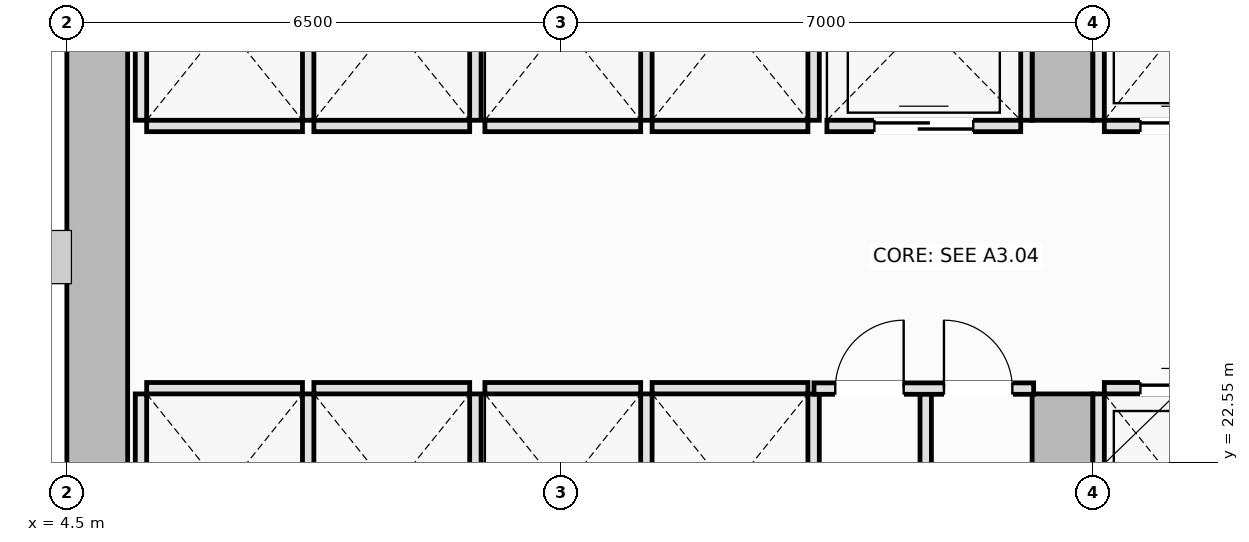
"""IFC4 building model, lengths in metres.
Left out: names, types, materials, properties, quantities, classifications, styles, units other than length and angle.
Written with IfcOpenShell. Run it as: python <this file> out.ifc"""

import sys

from ifc_helpers import new_model, si_unit, direction, frame, frame_2d, origin, place, context, subcontext, project, spatial, rectangle, extrude, element, fill, save


model = new_model("IFC4")
c1 = context("Model", 3, precision=1e-05, world=origin(), true_north=direction((0.0, 1.0)))
c2 = subcontext(c1, "Body", "Model", "MODEL_VIEW")
j1 = project(units=[si_unit("LENGTHUNIT", "METRE"), si_unit("PLANEANGLEUNIT", "RADIAN")], contexts=[c1])
p1 = place(None, origin())
s1 = spatial("IfcSite", under=j1, at=p1, CompositionType="ELEMENT")
p2 = place(p1, origin())
s2 = spatial("IfcBuilding", under=s1, at=p2, CompositionType="ELEMENT")
p3 = place(p2, frame((0.0, 0.0, 46.9)))
s3 = spatial("IfcBuildingStorey", under=s2, at=p3, CompositionType="ELEMENT", Elevation=46.9)
p4 = place(p3, frame((4.9, 14.8, 0.0), z_axis=(0.0, 0.0, 1.0), x_axis=(0.0, 1.0, 0.0)))
e1 = element("IfcWall", 1, at=p4, inside=s3, PredefinedType="SHEAR", context=c2, shape_type="SweptSolid", body=[
    extrude(rectangle(XDim=20.9, YDim=0.8, at=frame_2d((10.45, 0.0))), origin(), (0.0, 0.0, 1.0), 3.55),
])
p5 = place(p3, frame((17.6, 14.8, 0.0), z_axis=(0.0, 0.0, 1.0), x_axis=(0.0, 1.0, 0.0)))
e2 = element("IfcWall", 2, at=p5, inside=s3, PredefinedType="SHEAR", context=c2, shape_type="SweptSolid", body=[
    extrude(rectangle(XDim=8.65, YDim=0.8, at=frame_2d((4.325, 0.0))), origin(), (0.0, 0.0, 1.0), 3.55),
])
p6 = place(p5, frame((4.1, 0.0, 0.0)))
e3 = element("IfcOpeningElement", 3, at=p6, cuts=e2, PredefinedType="OPENING", context=c2, shape_type="SweptSolid", body=[
    extrude(rectangle(XDim=1.1, YDim=2.15, at=frame_2d((0.55, 1.075))), frame((0.0, 0.41, 0.0), z_axis=(0.0, -1.0, 0.0), x_axis=(1.0, 0.0, 0.0)), (0.0, 0.0, 1.0), 0.82),
])
p7 = place(p3, frame((17.6, 27.05, 0.0), z_axis=(0.0, 0.0, 1.0), x_axis=(0.0, 1.0, 0.0)))
e4 = element("IfcWall", 4, at=p7, inside=s3, PredefinedType="SHEAR", context=c2, shape_type="SweptSolid", body=[
    extrude(rectangle(XDim=8.65, YDim=0.8, at=frame_2d((4.325, 0.0))), origin(), (0.0, 0.0, 1.0), 3.55),
])
p8 = place(p7, frame((3.45, 0.0, 0.0)))
e5 = element("IfcOpeningElement", 5, at=p8, cuts=e4, PredefinedType="OPENING", context=c2, shape_type="SweptSolid", body=[
    extrude(rectangle(XDim=1.1, YDim=2.15, at=frame_2d((0.55, 1.075))), frame((0.0, 0.41, 0.0), z_axis=(0.0, -1.0, 0.0), x_axis=(1.0, 0.0, 0.0)), (0.0, 0.0, 1.0), 0.82),
])
p9 = place(p3, frame((18.15, 23.525, 0.0), z_axis=(0.0, 0.0, 1.0), x_axis=(1.0, 0.0, 0.0)))
e6 = element("IfcWall", 6, at=p9, inside=s3, PredefinedType="PARTITIONING", context=c2, shape_type="SweptSolid", body=[
    extrude(rectangle(XDim=2.05, YDim=0.15, at=frame_2d((1.025, 0.0))), origin(), (0.0, 0.0, 1.0), 3.37),
])
p10 = place(p9, frame((0.475, 0.0, 0.0)))
e7 = element("IfcOpeningElement", 7, at=p10, cuts=e6, PredefinedType="OPENING", context=c2, shape_type="SweptSolid", body=[
    extrude(rectangle(XDim=1.1, YDim=2.2, at=frame_2d((0.55, 1.1))), frame((0.0, 0.085, 0.0), z_axis=(0.0, -1.0, 0.0), x_axis=(1.0, 0.0, 0.0)), (0.0, 0.0, 1.0), 0.17),
])
p11 = place(p3, frame((18.075, 20.9, 0.0), z_axis=(0.0, 0.0, 1.0), x_axis=(0.0, 1.0, 0.0)))
e8 = element("IfcWall", 8, at=p11, inside=s3, PredefinedType="PARTITIONING", context=c2, shape_type="SweptSolid", body=[
    extrude(rectangle(XDim=2.55, YDim=0.15, at=frame_2d((1.275, 0.0))), origin(), (0.0, 0.0, 1.0), 3.37),
])
p12 = place(p3, frame((18.15, 26.975, 0.0), z_axis=(0.0, 0.0, 1.0), x_axis=(1.0, 0.0, 0.0)))
e9 = element("IfcWall", 9, at=p12, inside=s3, PredefinedType="PARTITIONING", context=c2, shape_type="SweptSolid", body=[
    extrude(rectangle(XDim=2.05, YDim=0.15, at=frame_2d((1.025, 0.0))), origin(), (0.0, 0.0, 1.0), 3.37),
])
p13 = place(p12, frame((0.475, 0.0, 0.0)))
e10 = element("IfcOpeningElement", 10, at=p13, cuts=e9, PredefinedType="OPENING", context=c2, shape_type="SweptSolid", body=[
    extrude(rectangle(XDim=1.1, YDim=2.2, at=frame_2d((0.55, 1.1))), frame((0.0, 0.085, 0.0), z_axis=(0.0, -1.0, 0.0), x_axis=(1.0, 0.0, 0.0)), (0.0, 0.0, 1.0), 0.17),
])
p14 = place(p3, frame((18.075, 27.05, 0.0), z_axis=(0.0, 0.0, 1.0), x_axis=(0.0, 1.0, 0.0)))
e11 = element("IfcWall", 11, at=p14, inside=s3, PredefinedType="PARTITIONING", context=c2, shape_type="SweptSolid", body=[
    extrude(rectangle(XDim=2.55, YDim=0.15, at=frame_2d((1.275, 0.0))), origin(), (0.0, 0.0, 1.0), 3.37),
])
p15 = place(p3, frame((5.55, 23.525, 0.0), z_axis=(0.0, 0.0, 1.0), x_axis=(1.0, 0.0, 0.0)))
e12 = element("IfcWall", 12, at=p15, inside=s3, PredefinedType="PARTITIONING", context=c2, shape_type="SweptSolid", body=[
    extrude(rectangle(XDim=2.05, YDim=0.15, at=frame_2d((1.025, 0.0))), origin(), (0.0, 0.0, 1.0), 3.37),
])
for number, where, z_axis, x_axis in (
    (13, (5.475, 20.9, 0.0), (0.0, 0.0, 1.0), (0.0, 1.0, 0.0)),
    (14, (7.675, 20.9, 0.0), (0.0, 0.0, 1.0), (0.0, 1.0, 0.0)),
):
    element("IfcWall", number, at=place(p3, frame(where, z_axis=z_axis, x_axis=x_axis)), inside=s3, PredefinedType="PARTITIONING", context=c2, shape_type="SweptSolid", body=[
        extrude(rectangle(XDim=2.55, YDim=0.15, at=frame_2d((1.275, 0.0))), origin(), (0.0, 0.0, 1.0), 3.37),
    ])
p16 = place(p3, frame((7.75, 23.525, 0.0), z_axis=(0.0, 0.0, 1.0), x_axis=(1.0, 0.0, 0.0)))
e15 = element("IfcWall", 15, at=p16, inside=s3, PredefinedType="PARTITIONING", context=c2, shape_type="SweptSolid", body=[
    extrude(rectangle(XDim=2.05, YDim=0.15, at=frame_2d((1.025, 0.0))), origin(), (0.0, 0.0, 1.0), 3.37),
])
p17 = place(p3, frame((9.875, 20.9, 0.0), z_axis=(0.0, 0.0, 1.0), x_axis=(0.0, 1.0, 0.0)))
e16 = element("IfcWall", 16, at=p17, inside=s3, PredefinedType="PARTITIONING", context=c2, shape_type="SweptSolid", body=[
    extrude(rectangle(XDim=2.55, YDim=0.15, at=frame_2d((1.275, 0.0))), origin(), (0.0, 0.0, 1.0), 3.37),
])
p18 = place(p3, frame((5.55, 26.975, 0.0), z_axis=(0.0, 0.0, 1.0), x_axis=(1.0, 0.0, 0.0)))
e17 = element("IfcWall", 17, at=p18, inside=s3, PredefinedType="PARTITIONING", context=c2, shape_type="SweptSolid", body=[
    extrude(rectangle(XDim=2.05, YDim=0.15, at=frame_2d((1.025, 0.0))), origin(), (0.0, 0.0, 1.0), 3.37),
])
for number, where, z_axis, x_axis in (
    (18, (5.475, 27.05, 0.0), (0.0, 0.0, 1.0), (0.0, 1.0, 0.0)),
    (19, (7.675, 27.05, 0.0), (0.0, 0.0, 1.0), (0.0, 1.0, 0.0)),
):
    element("IfcWall", number, at=place(p3, frame(where, z_axis=z_axis, x_axis=x_axis)), inside=s3, PredefinedType="PARTITIONING", context=c2, shape_type="SweptSolid", body=[
        extrude(rectangle(XDim=2.55, YDim=0.15, at=frame_2d((1.275, 0.0))), origin(), (0.0, 0.0, 1.0), 3.37),
    ])
p19 = place(p3, frame((7.75, 26.975, 0.0), z_axis=(0.0, 0.0, 1.0), x_axis=(1.0, 0.0, 0.0)))
e20 = element("IfcWall", 20, at=p19, inside=s3, PredefinedType="PARTITIONING", context=c2, shape_type="SweptSolid", body=[
    extrude(rectangle(XDim=2.05, YDim=0.15, at=frame_2d((1.025, 0.0))), origin(), (0.0, 0.0, 1.0), 3.37),
])
p20 = place(p3, frame((9.875, 27.05, 0.0), z_axis=(0.0, 0.0, 1.0), x_axis=(0.0, 1.0, 0.0)))
e21 = element("IfcWall", 21, at=p20, inside=s3, PredefinedType="PARTITIONING", context=c2, shape_type="SweptSolid", body=[
    extrude(rectangle(XDim=2.55, YDim=0.15, at=frame_2d((1.275, 0.0))), origin(), (0.0, 0.0, 1.0), 3.37),
])
p21 = place(p3, frame((10.0, 23.525, 0.0), z_axis=(0.0, 0.0, 1.0), x_axis=(1.0, 0.0, 0.0)))
e22 = element("IfcWall", 22, at=p21, inside=s3, PredefinedType="PARTITIONING", context=c2, shape_type="SweptSolid", body=[
    extrude(rectangle(XDim=2.05, YDim=0.15, at=frame_2d((1.025, 0.0))), origin(), (0.0, 0.0, 1.0), 3.37),
])
p22 = place(p3, frame((12.125, 20.9, 0.0), z_axis=(0.0, 0.0, 1.0), x_axis=(0.0, 1.0, 0.0)))
e23 = element("IfcWall", 23, at=p22, inside=s3, PredefinedType="PARTITIONING", context=c2, shape_type="SweptSolid", body=[
    extrude(rectangle(XDim=2.55, YDim=0.15, at=frame_2d((1.275, 0.0))), origin(), (0.0, 0.0, 1.0), 3.37),
])
p23 = place(p3, frame((12.2, 23.525, 0.0), z_axis=(0.0, 0.0, 1.0), x_axis=(1.0, 0.0, 0.0)))
e24 = element("IfcWall", 24, at=p23, inside=s3, PredefinedType="PARTITIONING", context=c2, shape_type="SweptSolid", body=[
    extrude(rectangle(XDim=2.05, YDim=0.15, at=frame_2d((1.025, 0.0))), origin(), (0.0, 0.0, 1.0), 3.37),
])
p24 = place(p3, frame((14.325, 20.9, 0.0), z_axis=(0.0, 0.0, 1.0), x_axis=(0.0, 1.0, 0.0)))
e25 = element("IfcWall", 25, at=p24, inside=s3, PredefinedType="PARTITIONING", context=c2, shape_type="SweptSolid", body=[
    extrude(rectangle(XDim=2.55, YDim=0.15, at=frame_2d((1.275, 0.0))), origin(), (0.0, 0.0, 1.0), 3.37),
])
p25 = place(p3, frame((10.0, 26.975, 0.0), z_axis=(0.0, 0.0, 1.0), x_axis=(1.0, 0.0, 0.0)))
e26 = element("IfcWall", 26, at=p25, inside=s3, PredefinedType="PARTITIONING", context=c2, shape_type="SweptSolid", body=[
    extrude(rectangle(XDim=2.05, YDim=0.15, at=frame_2d((1.025, 0.0))), origin(), (0.0, 0.0, 1.0), 3.37),
])
p26 = place(p3, frame((12.125, 27.05, 0.0), z_axis=(0.0, 0.0, 1.0), x_axis=(0.0, 1.0, 0.0)))
e27 = element("IfcWall", 27, at=p26, inside=s3, PredefinedType="PARTITIONING", context=c2, shape_type="SweptSolid", body=[
    extrude(rectangle(XDim=2.55, YDim=0.15, at=frame_2d((1.275, 0.0))), origin(), (0.0, 0.0, 1.0), 3.37),
])
p27 = place(p3, frame((12.2, 26.975, 0.0), z_axis=(0.0, 0.0, 1.0), x_axis=(1.0, 0.0, 0.0)))
e28 = element("IfcWall", 28, at=p27, inside=s3, PredefinedType="PARTITIONING", context=c2, shape_type="SweptSolid", body=[
    extrude(rectangle(XDim=2.05, YDim=0.15, at=frame_2d((1.025, 0.0))), origin(), (0.0, 0.0, 1.0), 3.37),
])
p28 = place(p3, frame((14.325, 27.05, 0.0), z_axis=(0.0, 0.0, 1.0), x_axis=(0.0, 1.0, 0.0)))
e29 = element("IfcWall", 29, at=p28, inside=s3, PredefinedType="PARTITIONING", context=c2, shape_type="SweptSolid", body=[
    extrude(rectangle(XDim=2.55, YDim=0.15, at=frame_2d((1.275, 0.0))), origin(), (0.0, 0.0, 1.0), 3.37),
])
p29 = place(p3, frame((14.5, 26.975, 0.0), z_axis=(0.0, 0.0, 1.0), x_axis=(1.0, 0.0, 0.0)))
e30 = element("IfcWall", 30, at=p29, inside=s3, PredefinedType="PARTITIONING", context=c2, shape_type="SweptSolid", body=[
    extrude(rectangle(XDim=2.55, YDim=0.15, at=frame_2d((1.275, 0.0))), origin(), (0.0, 0.0, 1.0), 3.37),
])
p30 = place(p29, frame((0.625, 0.0, 0.0)))
e31 = element("IfcOpeningElement", 31, at=p30, cuts=e30, PredefinedType="OPENING", context=c2, shape_type="SweptSolid", body=[
    extrude(rectangle(XDim=1.3, YDim=2.2, at=frame_2d((0.65, 1.1))), frame((0.0, 0.085, 0.0), z_axis=(0.0, -1.0, 0.0), x_axis=(1.0, 0.0, 0.0)), (0.0, 0.0, 1.0), 0.17),
])
p31 = place(p3, frame((17.125, 27.05, 0.0), z_axis=(0.0, 0.0, 1.0), x_axis=(0.0, 1.0, 0.0)))
e32 = element("IfcWall", 32, at=p31, inside=s3, PredefinedType="PARTITIONING", context=c2, shape_type="SweptSolid", body=[
    extrude(rectangle(XDim=2.6, YDim=0.15, at=frame_2d((1.3, 0.0))), origin(), (0.0, 0.0, 1.0), 3.37),
])
p32 = place(p3, frame((15.8, 20.85, 0.0), z_axis=(0.0, 0.0, 1.0), x_axis=(0.0, 1.0, 0.0)))
e33 = element("IfcWall", 33, at=p32, inside=s3, PredefinedType="PARTITIONING", context=c2, shape_type="SweptSolid", body=[
    extrude(rectangle(XDim=2.67, YDim=0.15, at=frame_2d((1.335, 0.0))), origin(), (0.0, 0.0, 1.0), 3.37),
])
p33 = place(p3, frame((14.33, 23.52, 0.0), z_axis=(0.0, 0.0, 1.0), x_axis=(1.0, 0.0, 0.0)))
e34 = element("IfcWall", 34, at=p33, inside=s3, PredefinedType="PARTITIONING", context=c2, shape_type="SweptSolid", body=[
    extrude(rectangle(XDim=2.89, YDim=0.15, at=frame_2d((1.445, 0.0))), origin(), (0.0, 0.0, 1.0), 3.37),
])
p34 = place(p33, frame((0.28, 0.0, 0.0)))
e35 = element("IfcOpeningElement", 35, at=p34, cuts=e34, PredefinedType="OPENING", context=c2, shape_type="SweptSolid", body=[
    extrude(rectangle(XDim=0.9, YDim=2.1, at=frame_2d((0.45, 1.05))), frame((0.0, 0.085, 0.0), z_axis=(0.0, -1.0, 0.0), x_axis=(1.0, 0.0, 0.0)), (0.0, 0.0, 1.0), 0.17),
])
p35 = place(p33, frame((1.71, 0.0, 0.0)))
e36 = element("IfcOpeningElement", 36, at=p35, cuts=e34, PredefinedType="OPENING", context=c2, shape_type="SweptSolid", body=[
    extrude(rectangle(XDim=0.9, YDim=2.1, at=frame_2d((0.45, 1.05))), frame((0.0, 0.085, 0.0), z_axis=(0.0, -1.0, 0.0), x_axis=(1.0, 0.0, 0.0)), (0.0, 0.0, 1.0), 0.17),
])
p36 = place(p10, origin())
e37 = element("IfcDoor", 37, at=p36, inside=s3, OperationType="DOUBLE_DOOR_SLIDING", PredefinedType="DOOR", context=c2, shape_type="SweptSolid", body=[
    extrude(rectangle(XDim=1.1, YDim=2.2, at=frame_2d((0.55, 1.1))), frame((0.0, 0.025, 0.0), z_axis=(0.0, -1.0, 0.0), x_axis=(1.0, 0.0, 0.0)), (0.0, 0.0, 1.0), 0.05),
])
fill(e7, e37)
p37 = place(p13, origin())
e38 = element("IfcDoor", 38, at=p37, inside=s3, OperationType="DOUBLE_DOOR_SLIDING", PredefinedType="DOOR", context=c2, shape_type="SweptSolid", body=[
    extrude(rectangle(XDim=1.1, YDim=2.2, at=frame_2d((0.55, 1.1))), frame((0.0, 0.025, 0.0), z_axis=(0.0, -1.0, 0.0), x_axis=(1.0, 0.0, 0.0)), (0.0, 0.0, 1.0), 0.05),
])
fill(e10, e38)
p38 = place(p30, origin())
e39 = element("IfcDoor", 39, at=p38, inside=s3, OperationType="DOUBLE_DOOR_SLIDING", PredefinedType="DOOR", context=c2, shape_type="SweptSolid", body=[
    extrude(rectangle(XDim=1.3, YDim=2.2, at=frame_2d((0.65, 1.1))), frame((0.0, 0.025, 0.0), z_axis=(0.0, -1.0, 0.0), x_axis=(1.0, 0.0, 0.0)), (0.0, 0.0, 1.0), 0.05),
])
fill(e31, e39)
p39 = place(p34, origin())
e40 = element("IfcDoor", 40, at=p39, inside=s3, OperationType="SINGLE_SWING_RIGHT", PredefinedType="DOOR", context=c2, shape_type="SweptSolid", body=[
    extrude(rectangle(XDim=0.9, YDim=2.1, at=frame_2d((0.45, 1.05))), frame((0.0, 0.025, 0.0), z_axis=(0.0, -1.0, 0.0), x_axis=(1.0, 0.0, 0.0)), (0.0, 0.0, 1.0), 0.05),
])
fill(e35, e40)
p40 = place(p35, origin())
e41 = element("IfcDoor", 41, at=p40, inside=s3, OperationType="SINGLE_SWING_LEFT", PredefinedType="DOOR", context=c2, shape_type="SweptSolid", body=[
    extrude(rectangle(XDim=0.9, YDim=2.1, at=frame_2d((0.45, 1.05))), frame((0.0, 0.025, 0.0), z_axis=(0.0, -1.0, 0.0), x_axis=(1.0, 0.0, 0.0)), (0.0, 0.0, 1.0), 0.05),
])
fill(e36, e41)
save(model, sys.argv[1])
